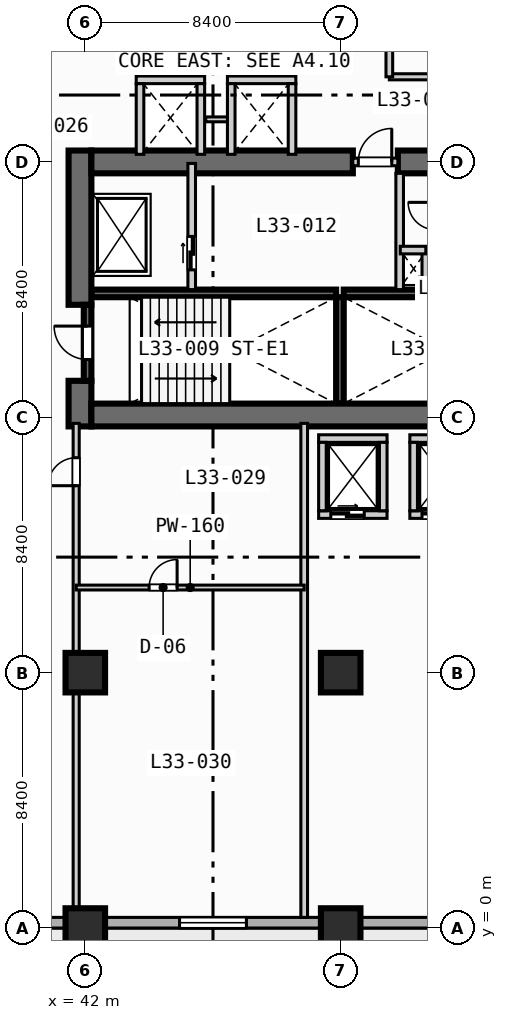
"""IFC4 building model, lengths in metres.
Left out: names, types, materials, properties, quantities, classifications, styles, units other than length and angle.
Written with IfcOpenShell. Run it as: python <this file> out.ifc"""

import sys

from ifc_helpers import new_model, si_unit, direction, frame, frame_2d, origin, origin_2d, place, context, subcontext, project, spatial, rectangle, extrude, element, fill, save


model = new_model("IFC4")
c1 = context("Model", 3, precision=1e-05, world=origin(), true_north=direction((0.0, 1.0)))
c2 = subcontext(c1, "Body", "Model", "MODEL_VIEW")
j1 = project(units=[si_unit("LENGTHUNIT", "METRE"), si_unit("PLANEANGLEUNIT", "RADIAN")], contexts=[c1])
p1 = place(None, origin())
s1 = spatial("IfcSite", under=j1, at=p1, CompositionType="ELEMENT")
p2 = place(p1, origin())
s2 = spatial("IfcBuilding", under=s1, at=p2, CompositionType="ELEMENT")
p3 = place(p2, frame((0.0, 0.0, 138.0)))
s3 = spatial("IfcBuildingStorey", under=s2, at=p3, CompositionType="ELEMENT", Elevation=138.0)
for number, where, z_axis, x_axis in (
    (1, (42.2, 20.875, 0.0), (0.0, 0.0, 1.0), (1.0, 0.0, 0.0)),
    (2, (50.5, 20.875, 0.0), (0.0, 0.0, 1.0), (1.0, 0.0, 0.0)),
):
    element("IfcWall", number, at=place(p3, frame(where, z_axis=z_axis, x_axis=x_axis)), inside=s3, PredefinedType="SOLIDWALL", context=c2, shape_type="SweptSolid", body=[
        extrude(rectangle(XDim=8.05, YDim=0.25, at=frame_2d((4.025, 0.0))), origin(), (0.0, 0.0, 1.0), 3.55),
    ])
p4 = place(p3, frame((50.375, 17.25, 0.0), z_axis=(0.0, 0.0, 1.0), x_axis=(0.0, 1.0, 0.0)))
e3 = element("IfcWall", 3, at=p4, inside=s3, PredefinedType="SOLIDWALL", context=c2, shape_type="SweptSolid", body=[
    extrude(rectangle(XDim=3.5, YDim=0.25, at=frame_2d((1.75, 0.0))), origin(), (0.0, 0.0, 1.0), 3.55),
])
p5 = place(p3, frame((41.825, 16.5, 0.0), z_axis=(0.0, 0.0, 1.0), x_axis=(0.0, 1.0, 0.0)))
e4 = element("IfcWall", 4, at=p5, inside=s3, PredefinedType="SHEAR", context=c2, shape_type="SweptSolid", body=[
    extrude(rectangle(XDim=1.5, YDim=0.75, at=frame_2d((0.75, 0.0))), origin(), (0.0, 0.0, 1.0), 3.55),
])
p6 = place(p3, frame((41.825, 20.5, 0.0), z_axis=(0.0, 0.0, 1.0), x_axis=(0.0, 1.0, 0.0)))
e5 = element("IfcWall", 5, at=p6, inside=s3, PredefinedType="SHEAR", context=c2, shape_type="SweptSolid", body=[
    extrude(rectangle(XDim=5.075, YDim=0.75, at=frame_2d((2.538, 0.0))), origin(), (0.0, 0.0, 1.0), 3.55),
])
p7 = place(p3, frame((42.2, 16.875, 0.0), z_axis=(0.0, 0.0, 1.0), x_axis=(1.0, 0.0, 0.0)))
e6 = element("IfcWall", 6, at=p7, inside=s3, PredefinedType="SHEAR", context=c2, shape_type="SweptSolid", body=[
    extrude(rectangle(XDim=16.35, YDim=0.75, at=frame_2d((8.175, 0.0))), origin(), (0.0, 0.0, 1.0), 3.55),
])
p8 = place(p3, frame((42.2, 25.2, 0.0), z_axis=(0.0, 0.0, 1.0), x_axis=(1.0, 0.0, 0.0)))
e7 = element("IfcWall", 7, at=p8, inside=s3, PredefinedType="SHEAR", context=c2, shape_type="SweptSolid", body=[
    extrude(rectangle(XDim=8.6, YDim=0.75, at=frame_2d((4.3, 0.0))), origin(), (0.0, 0.0, 1.0), 3.55),
])
p9 = place(p3, frame((52.28, 25.2, 0.0), z_axis=(0.0, 0.0, 1.0), x_axis=(1.0, 0.0, 0.0)))
e8 = element("IfcWall", 8, at=p9, inside=s3, PredefinedType="SHEAR", context=c2, shape_type="SweptSolid", body=[
    extrude(rectangle(XDim=1.27, YDim=0.75, at=frame_2d((0.635, 0.0))), origin(), (0.0, 0.0, 1.0), 3.55),
])
for number, where, z_axis, x_axis in (
    (9, (42.0, 0.0, 0.0), (0.0, 0.0, 1.0), (1.0, 0.0, 0.0)),
    (10, (42.0, 8.4, 0.0), (0.0, 0.0, 1.0), (1.0, 0.0, 0.0)),
    (11, (50.4, 0.0, 0.0), (0.0, 0.0, 1.0), (1.0, 0.0, 0.0)),
    (12, (50.4, 8.4, 0.0), (0.0, 0.0, 1.0), (1.0, 0.0, 0.0)),
):
    element("IfcColumn", number, at=place(p3, frame(where, z_axis=z_axis, x_axis=x_axis)), inside=s3, PredefinedType="COLUMN", context=c2, shape_type="SweptSolid", body=[
        extrude(rectangle(XDim=1.3, YDim=1.3, at=origin_2d()), origin(), (0.0, 0.0, 1.0), 3.8),
    ])
p10 = place(p3, frame((72.425, 0.175, 0.0), z_axis=(0.0, 0.0, 1.0), x_axis=(-1.0, 0.0, 0.0)))
e13 = element("IfcWall", 13, at=p10, inside=s3, PredefinedType="STANDARD", context=c2, shape_type="SweptSolid", body=[
    extrude(rectangle(XDim=69.25, YDim=0.35, at=frame_2d((34.625, 0.0))), origin(), (0.0, 0.0, 1.0), 3.55),
])
p11 = place(p10, frame((51.725, 0.0, 0.0)))
e14 = element("IfcOpeningElement", 14, at=p11, cuts=e13, PredefinedType="OPENING", context=c2, shape_type="SweptSolid", body=[
    extrude(rectangle(XDim=1.4, YDim=2.2, at=frame_2d((0.7, 1.1))), frame((0.0, 0.185, 0.0), z_axis=(0.0, -1.0, 0.0), x_axis=(1.0, 0.0, 0.0)), (0.0, 0.0, 1.0), 0.37),
])
p12 = place(p10, frame((58.725, 0.0, 0.85)))
e15 = element("IfcOpeningElement", 15, at=p12, cuts=e13, PredefinedType="OPENING", context=c2, shape_type="SweptSolid", body=[
    extrude(rectangle(XDim=2.2, YDim=1.8, at=frame_2d((1.1, 0.9))), frame((0.0, 0.185, 0.0), z_axis=(0.0, -1.0, 0.0), x_axis=(1.0, 0.0, 0.0)), (0.0, 0.0, 1.0), 0.37),
])
p13 = place(p10, frame((41.925, 0.0, 0.85)))
e16 = element("IfcOpeningElement", 16, at=p13, cuts=e13, PredefinedType="OPENING", context=c2, shape_type="SweptSolid", body=[
    extrude(rectangle(XDim=2.2, YDim=1.8, at=frame_2d((1.1, 0.9))), frame((0.0, 0.185, 0.0), z_axis=(0.0, -1.0, 0.0), x_axis=(1.0, 0.0, 0.0)), (0.0, 0.0, 1.0), 0.37),
])
p14 = place(p10, frame((33.525, 0.0, 0.85)))
e17 = element("IfcOpeningElement", 17, at=p14, cuts=e13, PredefinedType="OPENING", context=c2, shape_type="SweptSolid", body=[
    extrude(rectangle(XDim=2.2, YDim=1.8, at=frame_2d((1.1, 0.9))), frame((0.0, 0.185, 0.0), z_axis=(0.0, -1.0, 0.0), x_axis=(1.0, 0.0, 0.0)), (0.0, 0.0, 1.0), 0.37),
])
p15 = place(p10, frame((25.125, 0.0, 0.85)))
e18 = element("IfcOpeningElement", 18, at=p15, cuts=e13, PredefinedType="OPENING", context=c2, shape_type="SweptSolid", body=[
    extrude(rectangle(XDim=2.2, YDim=1.8, at=frame_2d((1.1, 0.9))), frame((0.0, 0.185, 0.0), z_axis=(0.0, -1.0, 0.0), x_axis=(1.0, 0.0, 0.0)), (0.0, 0.0, 1.0), 0.37),
])
p16 = place(p3, frame((42.075, 18.0, 0.0), z_axis=(0.0, 0.0, 1.0), x_axis=(0.0, 1.0, 0.0)))
e19 = element("IfcWall", 19, at=p16, inside=s3, PredefinedType="SOLIDWALL", context=c2, shape_type="SweptSolid", body=[
    extrude(rectangle(XDim=2.5, YDim=0.25, at=frame_2d((1.25, 0.0))), origin(), (0.0, 0.0, 1.0), 3.55),
])
p17 = place(p16, frame((0.7, 0.0, 0.0)))
e20 = element("IfcOpeningElement", 20, at=p17, cuts=e19, PredefinedType="OPENING", context=c2, shape_type="SweptSolid", body=[
    extrude(rectangle(XDim=1.1, YDim=2.15, at=frame_2d((0.55, 1.075))), frame((0.0, 0.135, 0.0), z_axis=(0.0, -1.0, 0.0), x_axis=(1.0, 0.0, 0.0)), (0.0, 0.0, 1.0), 0.27),
])
p18 = place(p3, frame((45.5, 21.0, 0.0), z_axis=(0.0, 0.0, 1.0), x_axis=(0.0, 1.0, 0.0)))
e21 = element("IfcWall", 21, at=p18, inside=s3, PredefinedType="SOLIDWALL", context=c2, shape_type="SweptSolid", body=[
    extrude(rectangle(XDim=4.15, YDim=0.25, at=frame_2d((2.075, 0.0))), origin(), (0.0, 0.0, 1.0), 3.55),
])
p19 = place(p18, frame((0.65, 0.0, 0.0)))
e22 = element("IfcOpeningElement", 22, at=p19, cuts=e21, PredefinedType="OPENING", context=c2, shape_type="SweptSolid", body=[
    extrude(rectangle(XDim=1.1, YDim=2.15, at=frame_2d((0.55, 1.075))), frame((0.0, 0.135, 0.0), z_axis=(0.0, -1.0, 0.0), x_axis=(1.0, 0.0, 0.0)), (0.0, 0.0, 1.0), 0.27),
])
p20 = place(p3, frame((50.8, 25.2, 0.0), z_axis=(0.0, 0.0, 1.0), x_axis=(1.0, 0.0, 0.0)))
e23 = element("IfcWall", 23, at=p20, inside=s3, PredefinedType="SOLIDWALL", context=c2, shape_type="SweptSolid", body=[
    extrude(rectangle(XDim=1.48, YDim=0.25, at=frame_2d((0.74, 0.0))), origin(), (0.0, 0.0, 1.0), 3.55),
])
p21 = place(p20, frame((0.18, 0.0, 0.0)))
e24 = element("IfcOpeningElement", 24, at=p21, cuts=e23, PredefinedType="OPENING", context=c2, shape_type="SweptSolid", body=[
    extrude(rectangle(XDim=1.1, YDim=2.15, at=frame_2d((0.55, 1.075))), frame((0.0, 0.135, 0.0), z_axis=(0.0, -1.0, 0.0), x_axis=(1.0, 0.0, 0.0)), (0.0, 0.0, 1.0), 0.27),
])
p22 = place(p3, frame((52.34, 21.0, 0.0), z_axis=(0.0, 0.0, 1.0), x_axis=(0.0, 1.0, 0.0)))
e25 = element("IfcWall", 25, at=p22, inside=s3, PredefinedType="SOLIDWALL", context=c2, shape_type="SweptSolid", body=[
    extrude(rectangle(XDim=3.825, YDim=0.25, at=frame_2d((1.913, 0.0))), origin(), (0.0, 0.0, 1.0), 3.55),
])
p23 = place(p3, frame((53.2, 21.0, 0.0), z_axis=(0.0, 0.0, 1.0), x_axis=(0.0, 1.0, 0.0)))
e26 = element("IfcWall", 26, at=p23, inside=s3, PredefinedType="SOLIDWALL", context=c2, shape_type="SweptSolid", body=[
    extrude(rectangle(XDim=1.3, YDim=0.25, at=frame_2d((0.65, 0.0))), origin(), (0.0, 0.0, 1.0), 3.55),
])
p24 = place(p3, frame((52.36, 22.3, 0.0), z_axis=(0.0, 0.0, 1.0), x_axis=(1.0, 0.0, 0.0)))
e27 = element("IfcWall", 27, at=p24, inside=s3, PredefinedType="SOLIDWALL", context=c2, shape_type="SweptSolid", body=[
    extrude(rectangle(XDim=0.84, YDim=0.25, at=frame_2d((0.42, 0.0))), origin(), (0.0, 0.0, 1.0), 3.55),
])
p25 = place(p3, frame((49.675, 13.6, 0.0), z_axis=(0.0, 0.0, 1.0), x_axis=(1.0, 0.0, 0.0)))
e28 = element("IfcWall", 28, at=p25, inside=s3, PredefinedType="SOLIDWALL", context=c2, shape_type="SweptSolid", body=[
    extrude(rectangle(XDim=2.25, YDim=0.25, at=frame_2d((1.125, 0.0))), origin(), (0.0, 0.0, 1.0), 3.55),
])
p26 = place(p25, frame((0.4, 0.0, 0.0)))
e29 = element("IfcOpeningElement", 29, at=p26, cuts=e28, PredefinedType="OPENING", context=c2, shape_type="SweptSolid", body=[
    extrude(rectangle(XDim=1.1, YDim=2.15, at=frame_2d((0.55, 1.075))), frame((0.0, 0.135, 0.0), z_axis=(0.0, -1.0, 0.0), x_axis=(1.0, 0.0, 0.0)), (0.0, 0.0, 1.0), 0.27),
])
for number, where, z_axis, x_axis in (
    (30, (49.675, 16.1, 0.0), (0.0, 0.0, 1.0), (1.0, 0.0, 0.0)),
    (31, (49.8, 13.725, 0.0), (0.0, 0.0, 1.0), (0.0, 1.0, 0.0)),
    (32, (51.8, 13.725, 0.0), (0.0, 0.0, 1.0), (0.0, 1.0, 0.0)),
):
    element("IfcWall", number, at=place(p3, frame(where, z_axis=z_axis, x_axis=x_axis)), inside=s3, PredefinedType="SOLIDWALL", context=c2, shape_type="SweptSolid", body=[
        extrude(rectangle(XDim=2.25, YDim=0.25, at=frame_2d((1.125, 0.0))), origin(), (0.0, 0.0, 1.0), 3.55),
    ])
p27 = place(p3, frame((52.675, 13.6, 0.0), z_axis=(0.0, 0.0, 1.0), x_axis=(1.0, 0.0, 0.0)))
e33 = element("IfcWall", 33, at=p27, inside=s3, PredefinedType="SOLIDWALL", context=c2, shape_type="SweptSolid", body=[
    extrude(rectangle(XDim=2.25, YDim=0.25, at=frame_2d((1.125, 0.0))), origin(), (0.0, 0.0, 1.0), 3.55),
])
p28 = place(p27, frame((0.4, 0.0, 0.0)))
e34 = element("IfcOpeningElement", 34, at=p28, cuts=e33, PredefinedType="OPENING", context=c2, shape_type="SweptSolid", body=[
    extrude(rectangle(XDim=1.1, YDim=2.15, at=frame_2d((0.55, 1.075))), frame((0.0, 0.135, 0.0), z_axis=(0.0, -1.0, 0.0), x_axis=(1.0, 0.0, 0.0)), (0.0, 0.0, 1.0), 0.27),
])
for number, where, z_axis, x_axis in (
    (35, (52.675, 16.1, 0.0), (0.0, 0.0, 1.0), (1.0, 0.0, 0.0)),
    (36, (52.8, 13.725, 0.0), (0.0, 0.0, 1.0), (0.0, 1.0, 0.0)),
    (37, (43.675, 27.9, 0.0), (0.0, 0.0, 1.0), (1.0, 0.0, 0.0)),
):
    element("IfcWall", number, at=place(p3, frame(where, z_axis=z_axis, x_axis=x_axis)), inside=s3, PredefinedType="SOLIDWALL", context=c2, shape_type="SweptSolid", body=[
        extrude(rectangle(XDim=2.25, YDim=0.25, at=frame_2d((1.125, 0.0))), origin(), (0.0, 0.0, 1.0), 3.55),
    ])
for number, where, z_axis, x_axis in (
    (38, (43.8, 25.45, 0.0), (0.0, 0.0, 1.0), (0.0, 1.0, 0.0)),
    (39, (45.8, 25.45, 0.0), (0.0, 0.0, 1.0), (0.0, 1.0, 0.0)),
):
    element("IfcWall", number, at=place(p3, frame(where, z_axis=z_axis, x_axis=x_axis)), inside=s3, PredefinedType="SOLIDWALL", context=c2, shape_type="SweptSolid", body=[
        extrude(rectangle(XDim=2.325, YDim=0.25, at=frame_2d((1.163, 0.0))), origin(), (0.0, 0.0, 1.0), 3.55),
    ])
p29 = place(p3, frame((45.96, 26.6, 0.0), z_axis=(0.0, 0.0, 1.0), x_axis=(1.0, 0.0, 0.0)))
e40 = element("IfcWall", 40, at=p29, inside=s3, PredefinedType="PARTITIONING", context=c2, shape_type="SweptSolid", body=[
    extrude(rectangle(XDim=0.88, YDim=0.16, at=frame_2d((0.44, 0.0))), origin(), (0.0, 0.0, 1.0), 3.55),
])
p30 = place(p3, frame((46.675, 27.9, 0.0), z_axis=(0.0, 0.0, 1.0), x_axis=(1.0, 0.0, 0.0)))
e41 = element("IfcWall", 41, at=p30, inside=s3, PredefinedType="SOLIDWALL", context=c2, shape_type="SweptSolid", body=[
    extrude(rectangle(XDim=2.25, YDim=0.25, at=frame_2d((1.125, 0.0))), origin(), (0.0, 0.0, 1.0), 3.55),
])
for number, where, z_axis, x_axis in (
    (42, (46.8, 25.45, 0.0), (0.0, 0.0, 1.0), (0.0, 1.0, 0.0)),
    (43, (48.8, 25.45, 0.0), (0.0, 0.0, 1.0), (0.0, 1.0, 0.0)),
):
    element("IfcWall", number, at=place(p3, frame(where, z_axis=z_axis, x_axis=x_axis)), inside=s3, PredefinedType="SOLIDWALL", context=c2, shape_type="SweptSolid", body=[
        extrude(rectangle(XDim=2.325, YDim=0.25, at=frame_2d((1.163, 0.0))), origin(), (0.0, 0.0, 1.0), 3.55),
    ])
p31 = place(p3, frame((41.7, 0.35, 0.0), z_axis=(0.0, 0.0, 1.0), x_axis=(0.0, 1.0, 0.0)))
e44 = element("IfcWall", 44, at=p31, inside=s3, PredefinedType="PARTITIONING", context=c2, shape_type="SweptSolid", body=[
    extrude(rectangle(XDim=16.25, YDim=0.2, at=frame_2d((8.125, 0.0))), origin(), (0.0, 0.0, 1.0), 2.8),
])
p32 = place(p31, frame((14.2, 0.0, 0.0)))
e45 = element("IfcOpeningElement", 45, at=p32, cuts=e44, PredefinedType="OPENING", context=c2, shape_type="SweptSolid", body=[
    extrude(rectangle(XDim=0.92, YDim=2.1, at=frame_2d((0.46, 1.05))), frame((0.0, 0.11, 0.0), z_axis=(0.0, -1.0, 0.0), x_axis=(1.0, 0.0, 0.0)), (0.0, 0.0, 1.0), 0.22),
])
p33 = place(p3, frame((49.2, 0.35, 0.0), z_axis=(0.0, 0.0, 1.0), x_axis=(0.0, 1.0, 0.0)))
e46 = element("IfcWall", 46, at=p33, inside=s3, PredefinedType="PARTITIONING", context=c2, shape_type="SweptSolid", body=[
    extrude(rectangle(XDim=16.25, YDim=0.22, at=frame_2d((8.125, 0.0))), origin(), (0.0, 0.0, 1.0), 3.55),
])
p34 = place(p3, frame((41.7, 11.2, 0.0), z_axis=(0.0, 0.0, 1.0), x_axis=(1.0, 0.0, 0.0)))
e47 = element("IfcWall", 47, at=p34, inside=s3, PredefinedType="PARTITIONING", context=c2, shape_type="SweptSolid", body=[
    extrude(rectangle(XDim=7.5, YDim=0.16, at=frame_2d((3.75, 0.0))), origin(), (0.0, 0.0, 1.0), 3.55),
])
p35 = place(p34, frame((2.4, 0.0, 0.0)))
e48 = element("IfcOpeningElement", 48, at=p35, cuts=e47, PredefinedType="OPENING", context=c2, shape_type="SweptSolid", body=[
    extrude(rectangle(XDim=0.92, YDim=2.1, at=frame_2d((0.46, 1.05))), frame((0.0, 0.09, 0.0), z_axis=(0.0, -1.0, 0.0), x_axis=(1.0, 0.0, 0.0)), (0.0, 0.0, 1.0), 0.18),
])
p36 = place(p3, frame((52.0, 28.0, 0.0), z_axis=(0.0, 0.0, 1.0), x_axis=(1.0, 0.0, 0.0)))
e49 = element("IfcWall", 49, at=p36, inside=s3, PredefinedType="PARTITIONING", context=c2, shape_type="SweptSolid", body=[
    extrude(rectangle(XDim=23.25, YDim=0.2, at=frame_2d((11.625, 0.0))), origin(), (0.0, 0.0, 1.0), 3.55),
])
p37 = place(p36, frame((4.0, 0.0, 0.0)))
e50 = element("IfcOpeningElement", 50, at=p37, cuts=e49, PredefinedType="OPENING", context=c2, shape_type="SweptSolid", body=[
    extrude(rectangle(XDim=0.92, YDim=2.1, at=frame_2d((0.46, 1.05))), frame((0.0, 0.11, 0.0), z_axis=(0.0, -1.0, 0.0), x_axis=(1.0, 0.0, 0.0)), (0.0, 0.0, 1.0), 0.22),
])
p38 = place(p3, frame((52.0, 28.0, 0.0), z_axis=(0.0, 0.0, 1.0), x_axis=(0.0, 1.0, 0.0)))
e51 = element("IfcWall", 51, at=p38, inside=s3, PredefinedType="PARTITIONING", context=c2, shape_type="SweptSolid", body=[
    extrude(rectangle(XDim=5.3, YDim=0.22, at=frame_2d((2.65, 0.0))), origin(), (0.0, 0.0, 1.0), 3.55),
])
p39 = place(p15, origin())
e52 = element("IfcWindow", 52, at=p39, inside=s3, PartitioningType="SINGLE_PANEL", PredefinedType="WINDOW", context=c2, shape_type="SweptSolid", body=[
    extrude(rectangle(XDim=2.2, YDim=1.8, at=frame_2d((1.1, 0.9))), frame((0.0, 0.03, 0.0), z_axis=(0.0, -1.0, 0.0), x_axis=(1.0, 0.0, 0.0)), (0.0, 0.0, 1.0), 0.06),
])
fill(e18, e52)
p40 = place(p17, origin())
e53 = element("IfcDoor", 53, at=p40, inside=s3, OperationType="SINGLE_SWING_RIGHT", PredefinedType="DOOR", context=c2, shape_type="SweptSolid", body=[
    extrude(rectangle(XDim=1.1, YDim=2.15, at=frame_2d((0.55, 1.075))), frame((0.0, 0.025, 0.0), z_axis=(0.0, -1.0, 0.0), x_axis=(1.0, 0.0, 0.0)), (0.0, 0.0, 1.0), 0.05),
])
fill(e20, e53)
p41 = place(p19, origin())
e54 = element("IfcDoor", 54, at=p41, inside=s3, OperationType="SLIDING_TO_LEFT", PredefinedType="DOOR", context=c2, shape_type="SweptSolid", body=[
    extrude(rectangle(XDim=1.1, YDim=2.15, at=frame_2d((0.55, 1.075))), frame((0.0, 0.025, 0.0), z_axis=(0.0, -1.0, 0.0), x_axis=(1.0, 0.0, 0.0)), (0.0, 0.0, 1.0), 0.05),
])
fill(e22, e54)
p42 = place(p21, origin())
e55 = element("IfcDoor", 55, at=p42, inside=s3, OperationType="SINGLE_SWING_RIGHT", PredefinedType="DOOR", context=c2, shape_type="SweptSolid", body=[
    extrude(rectangle(XDim=1.1, YDim=2.15, at=frame_2d((0.55, 1.075))), frame((0.0, 0.025, 0.0), z_axis=(0.0, -1.0, 0.0), x_axis=(1.0, 0.0, 0.0)), (0.0, 0.0, 1.0), 0.05),
])
fill(e24, e55)
p43 = place(p26, origin())
e56 = element("IfcDoor", 56, at=p43, inside=s3, OperationType="SLIDING_TO_LEFT", PredefinedType="DOOR", context=c2, shape_type="SweptSolid", body=[
    extrude(rectangle(XDim=1.1, YDim=2.15, at=frame_2d((0.55, 1.075))), frame((0.0, 0.025, 0.0), z_axis=(0.0, -1.0, 0.0), x_axis=(1.0, 0.0, 0.0)), (0.0, 0.0, 1.0), 0.05),
])
fill(e29, e56)
p44 = place(p28, origin())
e57 = element("IfcDoor", 57, at=p44, inside=s3, OperationType="SLIDING_TO_LEFT", PredefinedType="DOOR", context=c2, shape_type="SweptSolid", body=[
    extrude(rectangle(XDim=1.1, YDim=2.15, at=frame_2d((0.55, 1.075))), frame((0.0, 0.025, 0.0), z_axis=(0.0, -1.0, 0.0), x_axis=(1.0, 0.0, 0.0)), (0.0, 0.0, 1.0), 0.05),
])
fill(e34, e57)
p45 = place(p32, origin())
e58 = element("IfcDoor", 58, at=p45, inside=s3, OperationType="SINGLE_SWING_LEFT", PredefinedType="DOOR", context=c2, shape_type="SweptSolid", body=[
    extrude(rectangle(XDim=0.92, YDim=2.1, at=frame_2d((0.46, 1.05))), frame((0.0, 0.025, 0.0), z_axis=(0.0, -1.0, 0.0), x_axis=(1.0, 0.0, 0.0)), (0.0, 0.0, 1.0), 0.05),
])
fill(e45, e58)
p46 = place(p35, origin())
e59 = element("IfcDoor", 59, at=p46, inside=s3, OperationType="SINGLE_SWING_RIGHT", PredefinedType="DOOR", context=c2, shape_type="SweptSolid", body=[
    extrude(rectangle(XDim=0.92, YDim=2.1, at=frame_2d((0.46, 1.05))), frame((0.0, 0.025, 0.0), z_axis=(0.0, -1.0, 0.0), x_axis=(1.0, 0.0, 0.0)), (0.0, 0.0, 1.0), 0.05),
])
fill(e48, e59)
save(model, sys.argv[1])
